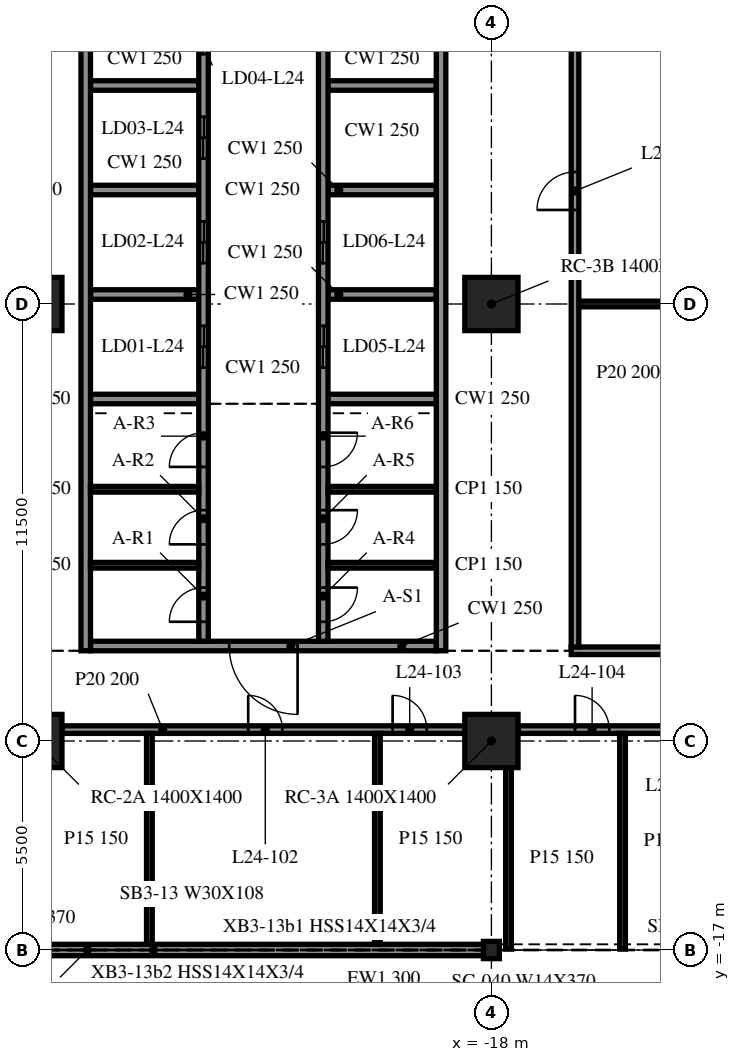
"""IFC4 building model, lengths in metres.
Left out: names, types, materials, properties, quantities, classifications, styles, units other than length and angle.
Written with IfcOpenShell. Run it as: python <this file> out.ifc"""

import sys

from ifc_helpers import new_model, si_unit, direction, frame, frame_2d, origin, origin_2d, place, context, subcontext, project, spatial, rectangle, i_section, extrude, element, fill, save


model = new_model("IFC4")
c1 = context("Model", 3, precision=1e-05, world=origin(), true_north=direction((0.0, 1.0)))
c2 = subcontext(c1, "Body", "Model", "MODEL_VIEW")
j1 = project(units=[si_unit("LENGTHUNIT", "METRE"), si_unit("PLANEANGLEUNIT", "RADIAN")], contexts=[c1])
p1 = place(None, origin())
s1 = spatial("IfcSite", under=j1, at=p1, CompositionType="ELEMENT")
p2 = place(p1, origin())
s2 = spatial("IfcBuilding", under=s1, at=p2, CompositionType="ELEMENT")
p3 = place(p2, frame((0.0, 0.0, 105.3)))
s3 = spatial("IfcBuildingStorey", under=s2, at=p3, CompositionType="ELEMENT", Elevation=105.3)
for number, where, z_axis, x_axis in (
    (1, (-30.0, -11.5, -0.34), (0.0, 0.0, 1.0), (1.0, 0.0, 0.0)),
    (2, (-30.0, 0.0, -0.34), (0.0, 0.0, 1.0), (1.0, 0.0, 0.0)),
    (3, (-18.0, -11.5, -0.34), (0.0, 0.0, 1.0), (1.0, 0.0, 0.0)),
    (4, (-18.0, 0.0, -0.34), (0.0, 0.0, 1.0), (1.0, 0.0, 0.0)),
):
    element("IfcColumn", number, at=place(p3, frame(where, z_axis=z_axis, x_axis=x_axis)), inside=s3, PredefinedType="COLUMN", context=c2, shape_type="SweptSolid", body=[
        extrude(rectangle(XDim=1.4, YDim=1.4, at=origin_2d()), origin(), (0.0, 0.0, 1.0), 4.1),
    ])
p4 = place(p3, frame((-18.0, -17.0, -0.34), z_axis=(0.0, 0.0, 1.0), x_axis=(1.0, 0.0, 0.0)))
e5 = element("IfcColumn", 5, at=p4, inside=s3, PredefinedType="COLUMN", context=c2, shape_type="SweptSolid", body=[
    extrude(i_section(OverallWidth=0.419, OverallDepth=0.455, WebThickness=0.042, FlangeThickness=0.068, at=origin_2d()), origin(), (0.0, 0.0, 1.0), 4.1),
])
p5 = place(p3, frame((-29.979, -17.0, 0.0), z_axis=(0.0, 0.0, 1.0), x_axis=(1.0, 0.0, 0.0)))
e6 = element("IfcWall", 6, at=p5, inside=s3, PredefinedType="NOTDEFINED", context=c2, shape_type="SweptSolid", body=[
    extrude(rectangle(XDim=11.958, YDim=0.3, at=frame_2d((5.979, 0.0))), origin(), (0.0, 0.0, 1.0), 3.003),
])
for number, where, z_axis, x_axis in (
    (7, (-28.675, 15.125, 0.0), (0.0, 0.0, 1.0), (0.0, -1.0, 0.0)),
    (8, (-19.325, -9.125, 0.0), (0.0, 0.0, 1.0), (0.0, 1.0, 0.0)),
):
    element("IfcWall", number, at=place(p3, frame(where, z_axis=z_axis, x_axis=x_axis)), inside=s3, PredefinedType="SOLIDWALL", context=c2, shape_type="SweptSolid", body=[
        extrude(rectangle(XDim=24.25, YDim=0.25, at=frame_2d((12.125, 0.0))), origin(), (0.0, 0.0, 1.0), 3.76),
    ])
p6 = place(p3, frame((-19.45, -9.0, 0.0), z_axis=(0.0, 0.0, 1.0), x_axis=(-1.0, 0.0, 0.0)))
e9 = element("IfcWall", 9, at=p6, inside=s3, PredefinedType="SOLIDWALL", context=c2, shape_type="SweptSolid", body=[
    extrude(rectangle(XDim=9.1, YDim=0.25, at=frame_2d((4.55, 0.0))), origin(), (0.0, 0.0, 1.0), 3.76),
])
p7 = place(p6, frame((3.65, 0.0, 0.0)))
e10 = element("IfcOpeningElement", 10, at=p7, cuts=e9, PredefinedType="OPENING", context=c2, shape_type="SweptSolid", body=[
    extrude(rectangle(XDim=1.8, YDim=2.1, at=frame_2d((0.9, 1.05))), frame((0.0, 0.135, 0.0), z_axis=(0.0, -1.0, 0.0), x_axis=(1.0, 0.0, 0.0)), (0.0, 0.0, 1.0), 0.27),
])
p8 = place(p3, frame((-25.575, -8.875, 0.0), z_axis=(0.0, 0.0, 1.0), x_axis=(0.0, 1.0, 0.0)))
e11 = element("IfcWall", 11, at=p8, inside=s3, PredefinedType="SOLIDWALL", context=c2, shape_type="SweptSolid", body=[
    extrude(rectangle(XDim=17.5, YDim=0.25, at=frame_2d((8.75, 0.0))), origin(), (0.0, 0.0, 1.0), 3.76),
])
p9 = place(p8, frame((7.2, 0.0, 0.0)))
e12 = element("IfcOpeningElement", 12, at=p9, cuts=e11, PredefinedType="OPENING", context=c2, shape_type="SweptSolid", body=[
    extrude(rectangle(XDim=1.1, YDim=2.1, at=frame_2d((0.55, 1.05))), frame((0.0, 0.135, 0.0), z_axis=(0.0, -1.0, 0.0), x_axis=(1.0, 0.0, 0.0)), (0.0, 0.0, 1.0), 0.27),
])
p10 = place(p8, frame((9.95, 0.0, 0.0)))
e13 = element("IfcOpeningElement", 13, at=p10, cuts=e11, PredefinedType="OPENING", context=c2, shape_type="SweptSolid", body=[
    extrude(rectangle(XDim=1.1, YDim=2.1, at=frame_2d((0.55, 1.05))), frame((0.0, 0.135, 0.0), z_axis=(0.0, -1.0, 0.0), x_axis=(1.0, 0.0, 0.0)), (0.0, 0.0, 1.0), 0.27),
])
p11 = place(p8, frame((12.7, 0.0, 0.0)))
e14 = element("IfcOpeningElement", 14, at=p11, cuts=e11, PredefinedType="OPENING", context=c2, shape_type="SweptSolid", body=[
    extrude(rectangle(XDim=1.1, YDim=2.1, at=frame_2d((0.55, 1.05))), frame((0.0, 0.135, 0.0), z_axis=(0.0, -1.0, 0.0), x_axis=(1.0, 0.0, 0.0)), (0.0, 0.0, 1.0), 0.27),
])
p12 = place(p8, frame((15.45, 0.0, 0.0)))
e15 = element("IfcOpeningElement", 15, at=p12, cuts=e11, PredefinedType="OPENING", context=c2, shape_type="SweptSolid", body=[
    extrude(rectangle(XDim=1.1, YDim=2.1, at=frame_2d((0.55, 1.05))), frame((0.0, 0.135, 0.0), z_axis=(0.0, -1.0, 0.0), x_axis=(1.0, 0.0, 0.0)), (0.0, 0.0, 1.0), 0.27),
])
p13 = place(p8, frame((0.512, 0.0, 0.0)))
e16 = element("IfcOpeningElement", 16, at=p13, cuts=e11, PredefinedType="OPENING", context=c2, shape_type="SweptSolid", body=[
    extrude(rectangle(XDim=0.9, YDim=2.1, at=frame_2d((0.45, 1.05))), frame((0.0, 0.135, 0.0), z_axis=(0.0, -1.0, 0.0), x_axis=(1.0, 0.0, 0.0)), (0.0, 0.0, 1.0), 0.27),
])
p14 = place(p8, frame((2.55, 0.0, 0.0)))
e17 = element("IfcOpeningElement", 17, at=p14, cuts=e11, PredefinedType="OPENING", context=c2, shape_type="SweptSolid", body=[
    extrude(rectangle(XDim=0.9, YDim=2.1, at=frame_2d((0.45, 1.05))), frame((0.0, 0.135, 0.0), z_axis=(0.0, -1.0, 0.0), x_axis=(1.0, 0.0, 0.0)), (0.0, 0.0, 1.0), 0.27),
])
p15 = place(p8, frame((4.587, 0.0, 0.0)))
e18 = element("IfcOpeningElement", 18, at=p15, cuts=e11, PredefinedType="OPENING", context=c2, shape_type="SweptSolid", body=[
    extrude(rectangle(XDim=0.9, YDim=2.1, at=frame_2d((0.45, 1.05))), frame((0.0, 0.135, 0.0), z_axis=(0.0, -1.0, 0.0), x_axis=(1.0, 0.0, 0.0)), (0.0, 0.0, 1.0), 0.27),
])
p16 = place(p3, frame((-22.425, 14.875, 0.0), z_axis=(0.0, 0.0, 1.0), x_axis=(0.0, -1.0, 0.0)))
e19 = element("IfcWall", 19, at=p16, inside=s3, PredefinedType="SOLIDWALL", context=c2, shape_type="SweptSolid", body=[
    extrude(rectangle(XDim=23.75, YDim=0.25, at=frame_2d((11.875, 0.0))), origin(), (0.0, 0.0, 1.0), 3.76),
])
p17 = place(p16, frame((15.45, 0.0, 0.0)))
e20 = element("IfcOpeningElement", 20, at=p17, cuts=e19, PredefinedType="OPENING", context=c2, shape_type="SweptSolid", body=[
    extrude(rectangle(XDim=1.1, YDim=2.1, at=frame_2d((0.55, 1.05))), frame((0.0, 0.135, 0.0), z_axis=(0.0, -1.0, 0.0), x_axis=(1.0, 0.0, 0.0)), (0.0, 0.0, 1.0), 0.27),
])
p18 = place(p16, frame((12.7, 0.0, 0.0)))
e21 = element("IfcOpeningElement", 21, at=p18, cuts=e19, PredefinedType="OPENING", context=c2, shape_type="SweptSolid", body=[
    extrude(rectangle(XDim=1.1, YDim=2.1, at=frame_2d((0.55, 1.05))), frame((0.0, 0.135, 0.0), z_axis=(0.0, -1.0, 0.0), x_axis=(1.0, 0.0, 0.0)), (0.0, 0.0, 1.0), 0.27),
])
p19 = place(p16, frame((22.337, 0.0, 0.0)))
e22 = element("IfcOpeningElement", 22, at=p19, cuts=e19, PredefinedType="OPENING", context=c2, shape_type="SweptSolid", body=[
    extrude(rectangle(XDim=0.9, YDim=2.1, at=frame_2d((0.45, 1.05))), frame((0.0, 0.135, 0.0), z_axis=(0.0, -1.0, 0.0), x_axis=(1.0, 0.0, 0.0)), (0.0, 0.0, 1.0), 0.27),
])
p20 = place(p16, frame((20.3, 0.0, 0.0)))
e23 = element("IfcOpeningElement", 23, at=p20, cuts=e19, PredefinedType="OPENING", context=c2, shape_type="SweptSolid", body=[
    extrude(rectangle(XDim=0.9, YDim=2.1, at=frame_2d((0.45, 1.05))), frame((0.0, 0.135, 0.0), z_axis=(0.0, -1.0, 0.0), x_axis=(1.0, 0.0, 0.0)), (0.0, 0.0, 1.0), 0.27),
])
p21 = place(p16, frame((18.262, 0.0, 0.0)))
e24 = element("IfcOpeningElement", 24, at=p21, cuts=e19, PredefinedType="OPENING", context=c2, shape_type="SweptSolid", body=[
    extrude(rectangle(XDim=0.9, YDim=2.1, at=frame_2d((0.45, 1.05))), frame((0.0, 0.135, 0.0), z_axis=(0.0, -1.0, 0.0), x_axis=(1.0, 0.0, 0.0)), (0.0, 0.0, 1.0), 0.27),
])
p22 = place(p16, frame((3.587, 0.0, 0.0)))
e25 = element("IfcOpeningElement", 25, at=p22, cuts=e19, PredefinedType="OPENING", context=c2, shape_type="SweptSolid", body=[
    extrude(rectangle(XDim=0.9, YDim=2.1, at=frame_2d((0.45, 1.05))), frame((0.0, 0.135, 0.0), z_axis=(0.0, -1.0, 0.0), x_axis=(1.0, 0.0, 0.0)), (0.0, 0.0, 1.0), 0.27),
])
p23 = place(p16, frame((0.512, 0.0, 0.0)))
e26 = element("IfcOpeningElement", 26, at=p23, cuts=e19, PredefinedType="OPENING", context=c2, shape_type="SweptSolid", body=[
    extrude(rectangle(XDim=0.9, YDim=2.1, at=frame_2d((0.45, 1.05))), frame((0.0, 0.135, 0.0), z_axis=(0.0, -1.0, 0.0), x_axis=(1.0, 0.0, 0.0)), (0.0, 0.0, 1.0), 0.27),
])
for number, where, z_axis, x_axis in (
    (27, (-28.55, -2.5, 0.0), (0.0, 0.0, 1.0), (1.0, 0.0, 0.0)),
    (28, (-28.55, 0.25, 0.0), (0.0, 0.0, 1.0), (1.0, 0.0, 0.0)),
    (29, (-28.55, 3.0, 0.0), (0.0, 0.0, 1.0), (1.0, 0.0, 0.0)),
    (30, (-28.55, 5.75, 0.0), (0.0, 0.0, 1.0), (1.0, 0.0, 0.0)),
    (31, (-22.3, -2.5, 0.0), (0.0, 0.0, 1.0), (1.0, 0.0, 0.0)),
    (32, (-22.3, 0.25, 0.0), (0.0, 0.0, 1.0), (1.0, 0.0, 0.0)),
    (33, (-22.3, 3.0, 0.0), (0.0, 0.0, 1.0), (1.0, 0.0, 0.0)),
    (34, (-22.3, 5.75, 0.0), (0.0, 0.0, 1.0), (1.0, 0.0, 0.0)),
):
    element("IfcWall", number, at=place(p3, frame(where, z_axis=z_axis, x_axis=x_axis)), inside=s3, PredefinedType="SOLIDWALL", context=c2, shape_type="SweptSolid", body=[
        extrude(rectangle(XDim=2.85, YDim=0.25, at=frame_2d((1.425, 0.0))), origin(), (0.0, 0.0, 1.0), 3.76),
    ])
for number, where, z_axis, x_axis in (
    (35, (-28.55, -6.875, 0.0), (0.0, 0.0, 1.0), (1.0, 0.0, 0.0)),
    (36, (-28.55, -4.875, 0.0), (0.0, 0.0, 1.0), (1.0, 0.0, 0.0)),
    (37, (-22.3, -6.875, 0.0), (0.0, 0.0, 1.0), (1.0, 0.0, 0.0)),
    (38, (-22.3, -4.875, 0.0), (0.0, 0.0, 1.0), (1.0, 0.0, 0.0)),
):
    element("IfcWall", number, at=place(p3, frame(where, z_axis=z_axis, x_axis=x_axis)), inside=s3, PredefinedType="PARTITIONING", context=c2, shape_type="SweptSolid", body=[
        extrude(rectangle(XDim=2.85, YDim=0.15, at=frame_2d((1.425, 0.0))), origin(), (0.0, 0.0, 1.0), 3.76),
    ])
p24 = place(p3, frame((-29.3, -11.2, 0.0), z_axis=(0.0, 0.0, 1.0), x_axis=(1.0, 0.0, 0.0)))
e39 = element("IfcWall", 39, at=p24, inside=s3, PredefinedType="PARTITIONING", context=c2, shape_type="SweptSolid", body=[
    extrude(rectangle(XDim=10.6, YDim=0.2, at=frame_2d((5.3, 0.0))), origin(), (0.0, 0.0, 1.0), 3.76),
])
p25 = place(p24, frame((4.9, 0.0, 0.0)))
e40 = element("IfcOpeningElement", 40, at=p25, cuts=e39, PredefinedType="OPENING", context=c2, shape_type="SweptSolid", body=[
    extrude(rectangle(XDim=0.9, YDim=2.1, at=frame_2d((0.45, 1.05))), frame((0.0, 0.11, 0.0), z_axis=(0.0, -1.0, 0.0), x_axis=(1.0, 0.0, 0.0)), (0.0, 0.0, 1.0), 0.22),
])
p26 = place(p24, frame((8.7, 0.0, 0.0)))
e41 = element("IfcOpeningElement", 41, at=p26, cuts=e39, PredefinedType="OPENING", context=c2, shape_type="SweptSolid", body=[
    extrude(rectangle(XDim=0.9, YDim=2.1, at=frame_2d((0.45, 1.05))), frame((0.0, 0.11, 0.0), z_axis=(0.0, -1.0, 0.0), x_axis=(1.0, 0.0, 0.0)), (0.0, 0.0, 1.0), 0.22),
])
p27 = place(p3, frame((-17.3, -11.2, 0.0), z_axis=(0.0, 0.0, 1.0), x_axis=(1.0, 0.0, 0.0)))
e42 = element("IfcWall", 42, at=p27, inside=s3, PredefinedType="PARTITIONING", context=c2, shape_type="SweptSolid", body=[
    extrude(rectangle(XDim=10.6, YDim=0.2, at=frame_2d((5.3, 0.0))), origin(), (0.0, 0.0, 1.0), 3.76),
])
p28 = place(p27, frame((1.5, 0.0, 0.0)))
e43 = element("IfcOpeningElement", 43, at=p28, cuts=e42, PredefinedType="OPENING", context=c2, shape_type="SweptSolid", body=[
    extrude(rectangle(XDim=0.9, YDim=2.1, at=frame_2d((0.45, 1.05))), frame((0.0, 0.11, 0.0), z_axis=(0.0, -1.0, 0.0), x_axis=(1.0, 0.0, 0.0)), (0.0, 0.0, 1.0), 0.22),
])
p29 = place(p27, frame((4.9, 0.0, 0.0)))
e44 = element("IfcOpeningElement", 44, at=p29, cuts=e42, PredefinedType="OPENING", context=c2, shape_type="SweptSolid", body=[
    extrude(rectangle(XDim=0.9, YDim=2.1, at=frame_2d((0.45, 1.05))), frame((0.0, 0.11, 0.0), z_axis=(0.0, -1.0, 0.0), x_axis=(1.0, 0.0, 0.0)), (0.0, 0.0, 1.0), 0.22),
])
p30 = place(p3, frame((-15.9, -9.125, 0.0), z_axis=(0.0, 0.0, 1.0), x_axis=(1.0, 0.0, 0.0)))
e45 = element("IfcWall", 45, at=p30, inside=s3, PredefinedType="PARTITIONING", context=c2, shape_type="SweptSolid", body=[
    extrude(rectangle(XDim=7.7, YDim=0.2, at=frame_2d((3.85, 0.0))), origin(), (0.0, 0.0, 1.0), 3.76),
])
p31 = place(p30, frame((3.3, 0.0, 0.0)))
e46 = element("IfcOpeningElement", 46, at=p31, cuts=e45, PredefinedType="OPENING", context=c2, shape_type="SweptSolid", body=[
    extrude(rectangle(XDim=1.2, YDim=2.1, at=frame_2d((0.6, 1.05))), frame((0.0, 0.11, 0.0), z_axis=(0.0, -1.0, 0.0), x_axis=(1.0, 0.0, 0.0)), (0.0, 0.0, 1.0), 0.22),
])
p32 = place(p3, frame((-15.7, 0.0, 0.0), z_axis=(0.0, 0.0, 1.0), x_axis=(1.0, 0.0, 0.0)))
e47 = element("IfcWall", 47, at=p32, inside=s3, PredefinedType="PARTITIONING", context=c2, shape_type="SweptSolid", body=[
    extrude(rectangle(XDim=7.3, YDim=0.15, at=frame_2d((3.65, 0.0))), origin(), (0.0, 0.0, 1.0), 3.76),
])
for number, where, z_axis, x_axis in (
    (48, (-27.0, -16.85, 0.0), (0.0, 0.0, 1.0), (0.0, 1.0, 0.0)),
    (49, (-21.0, -16.85, 0.0), (0.0, 0.0, 1.0), (0.0, 1.0, 0.0)),
):
    element("IfcWall", number, at=place(p3, frame(where, z_axis=z_axis, x_axis=x_axis)), inside=s3, PredefinedType="PARTITIONING", context=c2, shape_type="SweptSolid", body=[
        extrude(rectangle(XDim=5.55, YDim=0.15, at=frame_2d((2.775, 0.0))), origin(), (0.0, 0.0, 1.0), 3.76),
    ])
p33 = place(p3, frame((-17.55, -16.975, 0.0), z_axis=(0.0, 0.0, 1.0), x_axis=(0.0, 1.0, 0.0)))
e50 = element("IfcWall", 50, at=p33, inside=s3, PredefinedType="PARTITIONING", context=c2, shape_type="SweptSolid", body=[
    extrude(rectangle(XDim=4.775, YDim=0.15, at=frame_2d((2.388, 0.0))), origin(), (0.0, 0.0, 1.0), 3.76),
])
p34 = place(p3, frame((-15.8, -9.025, 0.0), z_axis=(0.0, 0.0, 1.0), x_axis=(0.0, 1.0, 0.0)))
e51 = element("IfcWall", 51, at=p34, inside=s3, PredefinedType="PARTITIONING", context=c2, shape_type="SweptSolid", body=[
    extrude(rectangle(XDim=24.05, YDim=0.2, at=frame_2d((12.025, 0.0))), origin(), (0.0, 0.0, 1.0), 3.76),
])
p35 = place(p34, frame((11.5, 0.0, 0.0)))
e52 = element("IfcOpeningElement", 52, at=p35, cuts=e51, PredefinedType="OPENING", context=c2, shape_type="SweptSolid", body=[
    extrude(rectangle(XDim=1.0, YDim=2.1, at=frame_2d((0.5, 1.05))), frame((0.0, 0.11, 0.0), z_axis=(0.0, -1.0, 0.0), x_axis=(1.0, 0.0, 0.0)), (0.0, 0.0, 1.0), 0.22),
])
p36 = place(p3, frame((-14.55, -16.975, 0.0), z_axis=(0.0, 0.0, 1.0), x_axis=(0.0, 1.0, 0.0)))
e53 = element("IfcWall", 53, at=p36, inside=s3, PredefinedType="PARTITIONING", context=c2, shape_type="SweptSolid", body=[
    extrude(rectangle(XDim=5.675, YDim=0.15, at=frame_2d((2.837, 0.0))), origin(), (0.0, 0.0, 1.0), 3.76),
])
p37 = place(p7, origin())
e54 = element("IfcDoor", 54, at=p37, inside=s3, OperationType="DOUBLE_DOOR_SINGLE_SWING", PredefinedType="DOOR", context=c2, shape_type="SweptSolid", body=[
    extrude(rectangle(XDim=1.8, YDim=2.1, at=frame_2d((0.9, 1.05))), frame((0.0, 0.025, 0.0), z_axis=(0.0, -1.0, 0.0), x_axis=(1.0, 0.0, 0.0)), (0.0, 0.0, 1.0), 0.05),
])
fill(e10, e54)
p38 = place(p17, origin())
e55 = element("IfcDoor", 55, at=p38, inside=s3, OperationType="DOUBLE_DOOR_SLIDING", PredefinedType="DOOR", context=c2, shape_type="SweptSolid", body=[
    extrude(rectangle(XDim=1.1, YDim=2.1, at=frame_2d((0.55, 1.05))), frame((0.0, 0.025, 0.0), z_axis=(0.0, -1.0, 0.0), x_axis=(1.0, 0.0, 0.0)), (0.0, 0.0, 1.0), 0.05),
])
fill(e20, e55)
p39 = place(p18, origin())
e56 = element("IfcDoor", 56, at=p39, inside=s3, OperationType="DOUBLE_DOOR_SLIDING", PredefinedType="DOOR", context=c2, shape_type="SweptSolid", body=[
    extrude(rectangle(XDim=1.1, YDim=2.1, at=frame_2d((0.55, 1.05))), frame((0.0, 0.025, 0.0), z_axis=(0.0, -1.0, 0.0), x_axis=(1.0, 0.0, 0.0)), (0.0, 0.0, 1.0), 0.05),
])
fill(e21, e56)
p40 = place(p9, origin())
e57 = element("IfcDoor", 57, at=p40, inside=s3, OperationType="DOUBLE_DOOR_SLIDING", PredefinedType="DOOR", context=c2, shape_type="SweptSolid", body=[
    extrude(rectangle(XDim=1.1, YDim=2.1, at=frame_2d((0.55, 1.05))), frame((0.0, 0.025, 0.0), z_axis=(0.0, -1.0, 0.0), x_axis=(1.0, 0.0, 0.0)), (0.0, 0.0, 1.0), 0.05),
])
fill(e12, e57)
p41 = place(p10, origin())
e58 = element("IfcDoor", 58, at=p41, inside=s3, OperationType="DOUBLE_DOOR_SLIDING", PredefinedType="DOOR", context=c2, shape_type="SweptSolid", body=[
    extrude(rectangle(XDim=1.1, YDim=2.1, at=frame_2d((0.55, 1.05))), frame((0.0, 0.025, 0.0), z_axis=(0.0, -1.0, 0.0), x_axis=(1.0, 0.0, 0.0)), (0.0, 0.0, 1.0), 0.05),
])
fill(e13, e58)
p42 = place(p11, origin())
e59 = element("IfcDoor", 59, at=p42, inside=s3, OperationType="DOUBLE_DOOR_SLIDING", PredefinedType="DOOR", context=c2, shape_type="SweptSolid", body=[
    extrude(rectangle(XDim=1.1, YDim=2.1, at=frame_2d((0.55, 1.05))), frame((0.0, 0.025, 0.0), z_axis=(0.0, -1.0, 0.0), x_axis=(1.0, 0.0, 0.0)), (0.0, 0.0, 1.0), 0.05),
])
fill(e14, e59)
p43 = place(p12, origin())
e60 = element("IfcDoor", 60, at=p43, inside=s3, OperationType="DOUBLE_DOOR_SLIDING", PredefinedType="DOOR", context=c2, shape_type="SweptSolid", body=[
    extrude(rectangle(XDim=1.1, YDim=2.1, at=frame_2d((0.55, 1.05))), frame((0.0, 0.025, 0.0), z_axis=(0.0, -1.0, 0.0), x_axis=(1.0, 0.0, 0.0)), (0.0, 0.0, 1.0), 0.05),
])
fill(e15, e60)
p44 = place(p13, origin())
e61 = element("IfcDoor", 61, at=p44, inside=s3, OperationType="SINGLE_SWING_LEFT", PredefinedType="DOOR", context=c2, shape_type="SweptSolid", body=[
    extrude(rectangle(XDim=0.9, YDim=2.1, at=frame_2d((0.45, 1.05))), frame((0.0, 0.025, 0.0), z_axis=(0.0, -1.0, 0.0), x_axis=(1.0, 0.0, 0.0)), (0.0, 0.0, 1.0), 0.05),
])
fill(e16, e61)
p45 = place(p14, origin())
e62 = element("IfcDoor", 62, at=p45, inside=s3, OperationType="SINGLE_SWING_RIGHT", PredefinedType="DOOR", context=c2, shape_type="SweptSolid", body=[
    extrude(rectangle(XDim=0.9, YDim=2.1, at=frame_2d((0.45, 1.05))), frame((0.0, 0.025, 0.0), z_axis=(0.0, -1.0, 0.0), x_axis=(1.0, 0.0, 0.0)), (0.0, 0.0, 1.0), 0.05),
])
fill(e17, e62)
p46 = place(p15, origin())
e63 = element("IfcDoor", 63, at=p46, inside=s3, OperationType="SINGLE_SWING_LEFT", PredefinedType="DOOR", context=c2, shape_type="SweptSolid", body=[
    extrude(rectangle(XDim=0.9, YDim=2.1, at=frame_2d((0.45, 1.05))), frame((0.0, 0.025, 0.0), z_axis=(0.0, -1.0, 0.0), x_axis=(1.0, 0.0, 0.0)), (0.0, 0.0, 1.0), 0.05),
])
fill(e18, e63)
p47 = place(p19, origin())
e64 = element("IfcDoor", 64, at=p47, inside=s3, OperationType="SINGLE_SWING_RIGHT", PredefinedType="DOOR", context=c2, shape_type="SweptSolid", body=[
    extrude(rectangle(XDim=0.9, YDim=2.1, at=frame_2d((0.45, 1.05))), frame((0.0, 0.025, 0.0), z_axis=(0.0, -1.0, 0.0), x_axis=(1.0, 0.0, 0.0)), (0.0, 0.0, 1.0), 0.05),
])
fill(e22, e64)
p48 = place(p20, origin())
e65 = element("IfcDoor", 65, at=p48, inside=s3, OperationType="SINGLE_SWING_LEFT", PredefinedType="DOOR", context=c2, shape_type="SweptSolid", body=[
    extrude(rectangle(XDim=0.9, YDim=2.1, at=frame_2d((0.45, 1.05))), frame((0.0, 0.025, 0.0), z_axis=(0.0, -1.0, 0.0), x_axis=(1.0, 0.0, 0.0)), (0.0, 0.0, 1.0), 0.05),
])
fill(e23, e65)
p49 = place(p21, origin())
e66 = element("IfcDoor", 66, at=p49, inside=s3, OperationType="SINGLE_SWING_RIGHT", PredefinedType="DOOR", context=c2, shape_type="SweptSolid", body=[
    extrude(rectangle(XDim=0.9, YDim=2.1, at=frame_2d((0.45, 1.05))), frame((0.0, 0.025, 0.0), z_axis=(0.0, -1.0, 0.0), x_axis=(1.0, 0.0, 0.0)), (0.0, 0.0, 1.0), 0.05),
])
fill(e24, e66)
p50 = place(p25, origin())
e67 = element("IfcDoor", 67, at=p50, inside=s3, OperationType="SINGLE_SWING_LEFT", PredefinedType="DOOR", context=c2, shape_type="SweptSolid", body=[
    extrude(rectangle(XDim=0.9, YDim=2.1, at=frame_2d((0.45, 1.05))), frame((0.0, 0.025, 0.0), z_axis=(0.0, -1.0, 0.0), x_axis=(1.0, 0.0, 0.0)), (0.0, 0.0, 1.0), 0.05),
])
fill(e40, e67)
p51 = place(p26, origin())
e68 = element("IfcDoor", 68, at=p51, inside=s3, OperationType="SINGLE_SWING_LEFT", PredefinedType="DOOR", context=c2, shape_type="SweptSolid", body=[
    extrude(rectangle(XDim=0.9, YDim=2.1, at=frame_2d((0.45, 1.05))), frame((0.0, 0.025, 0.0), z_axis=(0.0, -1.0, 0.0), x_axis=(1.0, 0.0, 0.0)), (0.0, 0.0, 1.0), 0.05),
])
fill(e41, e68)
p52 = place(p28, origin())
e69 = element("IfcDoor", 69, at=p52, inside=s3, OperationType="SINGLE_SWING_RIGHT", PredefinedType="DOOR", context=c2, shape_type="SweptSolid", body=[
    extrude(rectangle(XDim=0.9, YDim=2.1, at=frame_2d((0.45, 1.05))), frame((0.0, 0.025, 0.0), z_axis=(0.0, -1.0, 0.0), x_axis=(1.0, 0.0, 0.0)), (0.0, 0.0, 1.0), 0.05),
])
fill(e43, e69)
p53 = place(p35, origin())
e70 = element("IfcDoor", 70, at=p53, inside=s3, OperationType="SINGLE_SWING_RIGHT", PredefinedType="DOOR", context=c2, shape_type="SweptSolid", body=[
    extrude(rectangle(XDim=1.0, YDim=2.1, at=frame_2d((0.5, 1.05))), frame((0.0, 0.025, 0.0), z_axis=(0.0, -1.0, 0.0), x_axis=(1.0, 0.0, 0.0)), (0.0, 0.0, 1.0), 0.05),
])
fill(e52, e70)
save(model, sys.argv[1])
